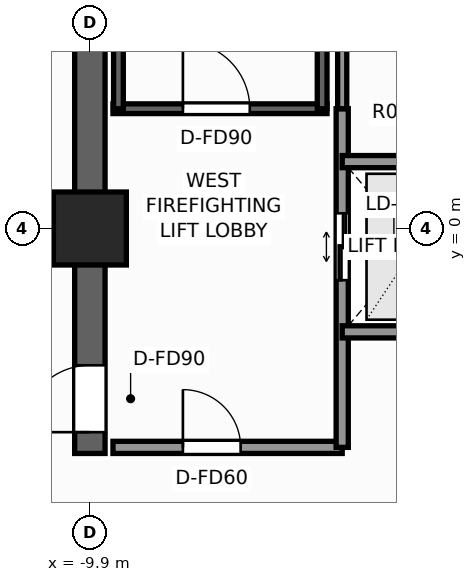
"""IFC4 building model, lengths in metres.
Left out: names, types, materials, properties, quantities, classifications, styles, units other than length and angle.
Written with IfcOpenShell. Run it as: python <this file> out.ifc"""

import sys

from ifc_helpers import new_model, si_unit, direction, frame, frame_2d, origin, origin_2d, place, context, subcontext, project, spatial, rectangle, extrude, element, fill, save


model = new_model("IFC4")
c1 = context("Model", 3, precision=1e-05, world=origin(), true_north=direction((0.0, 1.0)))
c2 = subcontext(c1, "Body", "Model", "MODEL_VIEW")
j1 = project(units=[si_unit("LENGTHUNIT", "METRE"), si_unit("PLANEANGLEUNIT", "RADIAN")], contexts=[c1])
p1 = place(None, origin())
s1 = spatial("IfcSite", under=j1, at=p1, CompositionType="ELEMENT")
p2 = place(p1, origin())
s2 = spatial("IfcBuilding", under=s1, at=p2, CompositionType="ELEMENT")
p3 = place(p2, frame((0.0, 0.0, 166.8)))
s3 = spatial("IfcBuildingStorey", under=s2, at=p3, CompositionType="ELEMENT", Elevation=166.8)
p4 = place(p3, frame((-9.9, -3.7, 0.0), z_axis=(0.0, 0.0, 1.0), x_axis=(0.0, 1.0, 0.0)))
e1 = element("IfcWall", 1, at=p4, inside=s3, PredefinedType="SHEAR", context=c2, shape_type="SweptSolid", body=[
    extrude(rectangle(XDim=13.35, YDim=0.5, at=frame_2d((6.675, 0.0))), origin(), (0.0, 0.0, 1.0), 3.3),
])
p5 = place(p4, frame((0.35, 0.0, 0.0)))
e2 = element("IfcOpeningElement", 2, at=p5, cuts=e1, PredefinedType="OPENING", context=c2, shape_type="SweptSolid", body=[
    extrude(rectangle(XDim=1.1, YDim=2.2, at=frame_2d((0.55, 1.1))), frame((0.0, 0.26, 0.0), z_axis=(0.0, -1.0, 0.0), x_axis=(1.0, 0.0, 0.0)), (0.0, 0.0, 1.0), 0.52),
])
p6 = place(p3, frame((-9.9, 0.0, 0.0), z_axis=(0.0, 0.0, 1.0), x_axis=(1.0, 0.0, 0.0)))
e3 = element("IfcColumn", 3, at=p6, inside=s3, PredefinedType="COLUMN", context=c2, shape_type="SweptSolid", body=[
    extrude(rectangle(XDim=1.2, YDim=1.2, at=origin_2d()), origin(), (0.0, 0.0, 1.0), 3.3),
])
p7 = place(p3, frame((-9.52, 1.97, 0.0), z_axis=(0.0, 0.0, 1.0), x_axis=(1.0, 0.0, 0.0)))
e4 = element("IfcWall", 4, at=p7, inside=s3, PredefinedType="SHEAR", context=c2, shape_type="SweptSolid", body=[
    extrude(rectangle(XDim=3.52, YDim=0.16, at=frame_2d((1.76, 0.0))), origin(), (0.0, 0.0, 1.0), 3.3),
])
p8 = place(p7, frame((1.15, 0.0, 0.0)))
e5 = element("IfcOpeningElement", 5, at=p8, cuts=e4, PredefinedType="OPENING", context=c2, shape_type="SweptSolid", body=[
    extrude(rectangle(XDim=1.1, YDim=2.2, at=frame_2d((0.55, 1.1))), frame((0.0, 0.09, 0.0), z_axis=(0.0, -1.0, 0.0), x_axis=(1.0, 0.0, 0.0)), (0.0, 0.0, 1.0), 0.18),
])
for number, where, z_axis, x_axis in (
    (6, (-9.43, 1.97, 0.0), (0.0, 0.0, 1.0), (0.0, 1.0, 0.0)),
    (7, (-6.08, 1.97, 0.0), (0.0, 0.0, 1.0), (0.0, 1.0, 0.0)),
):
    element("IfcWall", number, at=place(p3, frame(where, z_axis=z_axis, x_axis=x_axis)), inside=s3, PredefinedType="SHEAR", context=c2, shape_type="SweptSolid", body=[
        extrude(rectangle(XDim=7.56, YDim=0.16, at=frame_2d((3.78, 0.0))), origin(), (0.0, 0.0, 1.0), 3.3),
    ])
p9 = place(p3, frame((-9.52, -3.6, 0.0), z_axis=(0.0, 0.0, 1.0), x_axis=(1.0, 0.0, 0.0)))
e8 = element("IfcWall", 8, at=p9, inside=s3, PredefinedType="SOLIDWALL", context=c2, shape_type="SweptSolid", body=[
    extrude(rectangle(XDim=3.77, YDim=0.2, at=frame_2d((1.885, 0.0))), origin(), (0.0, 0.0, 1.0), 3.1),
])
p10 = place(p9, frame((1.15, 0.0, 0.0)))
e9 = element("IfcOpeningElement", 9, at=p10, cuts=e8, PredefinedType="OPENING", context=c2, shape_type="SweptSolid", body=[
    extrude(rectangle(XDim=0.95, YDim=2.06, at=frame_2d((0.475, 1.03))), frame((0.0, 0.11, 0.0), z_axis=(0.0, -1.0, 0.0), x_axis=(1.0, 0.0, 0.0)), (0.0, 0.0, 1.0), 0.22),
])
p11 = place(p3, frame((-5.75, -3.6, 0.0), z_axis=(0.0, 0.0, 1.0), x_axis=(0.0, 1.0, 0.0)))
e10 = element("IfcWall", 10, at=p11, inside=s3, PredefinedType="SOLIDWALL", context=c2, shape_type="SweptSolid", body=[
    extrude(rectangle(XDim=5.57, YDim=0.2, at=frame_2d((2.785, 0.0))), origin(), (0.0, 0.0, 1.0), 2.735),
])
p12 = place(p11, frame((2.75, 0.0, 0.0)))
e11 = element("IfcOpeningElement", 11, at=p12, cuts=e10, PredefinedType="OPENING", context=c2, shape_type="SweptSolid", body=[
    extrude(rectangle(XDim=1.1, YDim=2.2, at=frame_2d((0.55, 1.1))), frame((0.0, 0.11, 0.0), z_axis=(0.0, -1.0, 0.0), x_axis=(1.0, 0.0, 0.0)), (0.0, 0.0, 1.0), 0.22),
])
for number, where, z_axis, x_axis in (
    (12, (-5.75, -1.7, 0.0), (0.0, 0.0, 1.0), (1.0, 0.0, 0.0)),
    (13, (-5.75, 1.1, 0.0), (0.0, 0.0, 1.0), (1.0, 0.0, 0.0)),
):
    element("IfcWall", number, at=place(p3, frame(where, z_axis=z_axis, x_axis=x_axis)), inside=s3, PredefinedType="SOLIDWALL", context=c2, shape_type="SweptSolid", body=[
        extrude(rectangle(XDim=2.4, YDim=0.2, at=frame_2d((1.2, 0.0))), origin(), (0.0, 0.0, 1.0), 3.1),
    ])
p13 = place(p3, frame((-5.75, 1.97, 0.0), z_axis=(0.0, 0.0, 1.0), x_axis=(0.0, 1.0, 0.0)))
e14 = element("IfcWall", 14, at=p13, inside=s3, PredefinedType="PARTITIONING", context=c2, shape_type="SweptSolid", body=[
    extrude(rectangle(XDim=2.33, YDim=0.15, at=frame_2d((1.165, 0.0))), origin(), (0.0, 0.0, 1.0), 2.735),
])
p14 = place(p8, origin())
e15 = element("IfcDoor", 15, at=p14, inside=s3, OperationType="SINGLE_SWING_LEFT", PredefinedType="DOOR", context=c2, shape_type="SweptSolid", body=[
    extrude(rectangle(XDim=1.1, YDim=2.2, at=frame_2d((0.55, 1.1))), frame((0.0, 0.025, 0.0), z_axis=(0.0, -1.0, 0.0), x_axis=(1.0, 0.0, 0.0)), (0.0, 0.0, 1.0), 0.05),
])
fill(e5, e15)
p15 = place(p5, origin())
e16 = element("IfcDoor", 16, at=p15, inside=s3, OperationType="SINGLE_SWING_LEFT", PredefinedType="DOOR", context=c2, shape_type="SweptSolid", body=[
    extrude(rectangle(XDim=1.1, YDim=2.2, at=frame_2d((0.55, 1.1))), frame((0.0, 0.025, 0.0), z_axis=(0.0, -1.0, 0.0), x_axis=(1.0, 0.0, 0.0)), (0.0, 0.0, 1.0), 0.05),
])
fill(e2, e16)
p16 = place(p12, origin())
e17 = element("IfcDoor", 17, at=p16, inside=s3, OperationType="DOUBLE_DOOR_SLIDING", PredefinedType="DOOR", context=c2, shape_type="SweptSolid", body=[
    extrude(rectangle(XDim=1.1, YDim=2.2, at=frame_2d((0.55, 1.1))), frame((0.0, 0.025, 0.0), z_axis=(0.0, -1.0, 0.0), x_axis=(1.0, 0.0, 0.0)), (0.0, 0.0, 1.0), 0.05),
])
fill(e11, e17)
p17 = place(p10, origin())
e18 = element("IfcDoor", 18, at=p17, inside=s3, OperationType="SINGLE_SWING_LEFT", PredefinedType="DOOR", context=c2, shape_type="SweptSolid", body=[
    extrude(rectangle(XDim=0.95, YDim=2.06, at=frame_2d((0.475, 1.03))), frame((0.0, 0.025, 0.0), z_axis=(0.0, -1.0, 0.0), x_axis=(1.0, 0.0, 0.0)), (0.0, 0.0, 1.0), 0.05),
])
fill(e9, e18)
save(model, sys.argv[1])
